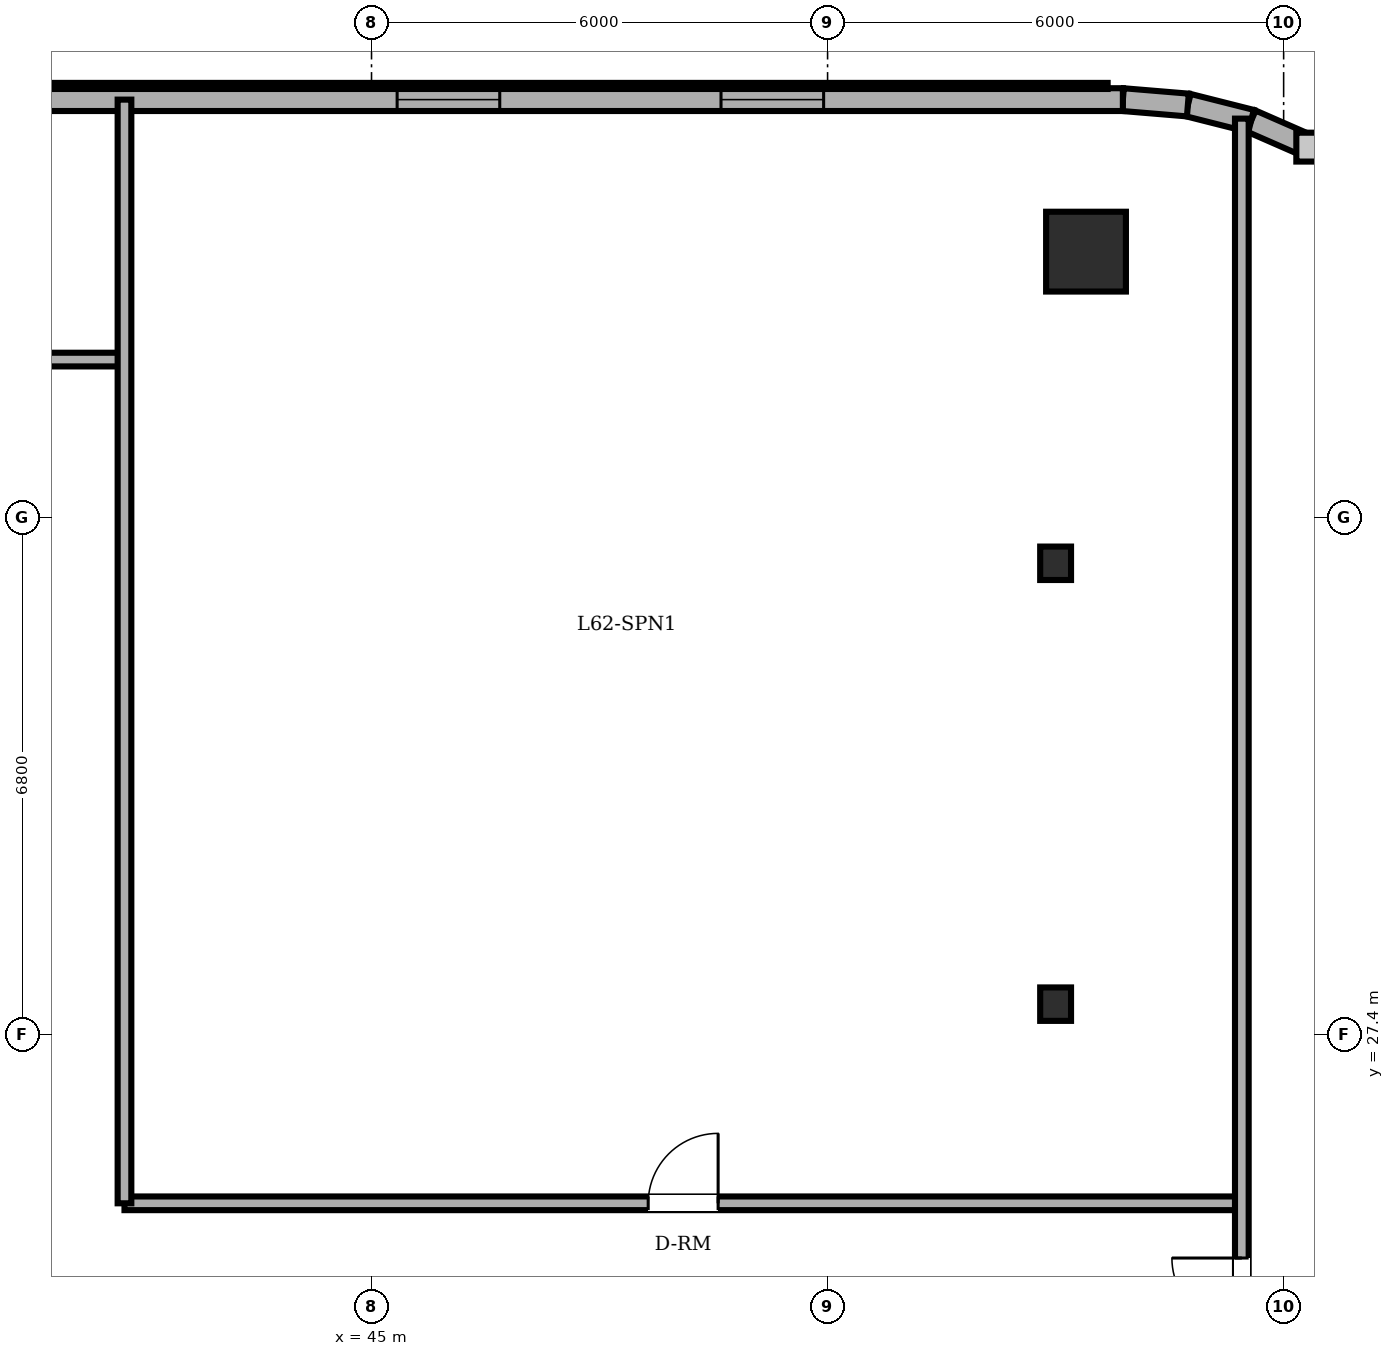
"""IFC4 building model, lengths in metres.
Left out: names, types, materials, properties, quantities, classifications, styles, units other than length and angle.
Written with IfcOpenShell. Run it as: python <this file> out.ifc"""

import sys

from ifc_helpers import new_model, si_unit, direction, frame, frame_2d, origin, origin_2d, place, context, subcontext, project, spatial, rectangle, circle, i_section, extrude, element, fill, save


model = new_model("IFC4")
c1 = context("Model", 3, precision=1e-05, world=origin(), true_north=direction((0.0, 1.0)))
c2 = subcontext(c1, "Body", "Model", "MODEL_VIEW")
j1 = project(units=[si_unit("LENGTHUNIT", "METRE"), si_unit("PLANEANGLEUNIT", "RADIAN")], contexts=[c1])
p1 = place(None, origin())
s1 = spatial("IfcSite", under=j1, at=p1, CompositionType="ELEMENT")
p2 = place(p1, origin())
s2 = spatial("IfcBuilding", under=s1, at=p2, CompositionType="ELEMENT")
p3 = place(p2, frame((0.0, 0.0, 237.3)))
s3 = spatial("IfcBuildingStorey", under=s2, at=p3, CompositionType="ELEMENT", Elevation=237.3)
p4 = place(p3, frame((54.4, 37.7, 0.0), z_axis=(0.0, 0.0, 1.0), x_axis=(1.0, 0.0, 0.0)))
e1 = element("IfcColumn", 1, at=p4, inside=s3, PredefinedType="COLUMN", context=c2, shape_type="SweptSolid", body=[
    extrude(circle(Radius=0.525, at=origin_2d()), origin(), (0.0, 0.0, 1.0), 3.6),
])
for number, where, z_axis, x_axis in (
    (2, (54.0, 27.8, 0.0), (0.0, 0.0, 1.0), (1.0, 0.0, 0.0)),
    (3, (54.0, 33.6, 0.0), (0.0, 0.0, 1.0), (1.0, 0.0, 0.0)),
):
    element("IfcColumn", number, at=place(p3, frame(where, z_axis=z_axis, x_axis=x_axis)), inside=s3, PredefinedType="COLUMN", context=c2, shape_type="SweptSolid", body=[
        extrude(i_section(OverallWidth=0.406, OverallDepth=0.44, WebThickness=0.024, FlangeThickness=0.039, FilletRadius=0.015, at=origin_2d()), origin(), (0.0, 0.0, 1.0), 3.6),
    ])
p5 = place(p3, frame((57.357, 39.075, 0.0), z_axis=(0.0, 0.0, 1.0), x_axis=(-0.916085473636, 0.400983048261, 0.0)))
e4 = element("IfcWall", 4, at=p5, inside=s3, PredefinedType="SOLIDWALL", context=c2, shape_type="SweptSolid", body=[
    extrude(rectangle(XDim=0.858, YDim=0.3, at=frame_2d((0.429, 0.0))), origin(), (0.0, 0.0, 1.0), 3.4),
])
p6 = place(p3, frame((56.571, 39.419, 0.0), z_axis=(0.0, 0.0, 1.0), x_axis=(-0.969536346338, 0.244947490555, 0.0)))
e5 = element("IfcWall", 5, at=p6, inside=s3, PredefinedType="SOLIDWALL", context=c2, shape_type="SweptSolid", body=[
    extrude(rectangle(XDim=0.857, YDim=0.3, at=frame_2d((0.429, 0.0))), origin(), (0.0, 0.0, 1.0), 3.4),
])
p7 = place(p3, frame((55.74, 39.629, 0.0), z_axis=(0.0, 0.0, 1.0), x_axis=(-0.996565355958, 0.082809971041, 0.0)))
e6 = element("IfcWall", 6, at=p7, inside=s3, PredefinedType="SOLIDWALL", context=c2, shape_type="SweptSolid", body=[
    extrude(rectangle(XDim=0.858, YDim=0.3, at=frame_2d((0.429, 0.0))), origin(), (0.0, 0.0, 1.0), 3.4),
])
p8 = place(p3, frame((54.885, 39.7, 0.0), z_axis=(0.0, 0.0, 1.0), x_axis=(-1.0, 0.0, 0.0)))
e7 = element("IfcWall", 7, at=p8, inside=s3, PredefinedType="SOLIDWALL", context=c2, shape_type="SweptSolid", body=[
    extrude(rectangle(XDim=32.485, YDim=0.3, at=frame_2d((16.243, 0.0))), origin(), (0.0, 0.0, 1.0), 3.4),
])
p9 = place(p8, frame((27.685, 0.0, 0.0)))
e8 = element("IfcOpeningElement", 8, at=p9, cuts=e7, PredefinedType="OPENING", context=c2, shape_type="SweptSolid", body=[
    extrude(rectangle(XDim=0.95, YDim=2.2, at=frame_2d((0.475, 1.1))), frame((0.0, 0.16, 0.0), z_axis=(0.0, -1.0, 0.0), x_axis=(1.0, 0.0, 0.0)), (0.0, 0.0, 1.0), 0.32),
])
p10 = place(p8, frame((3.937, 0.0, 0.85)))
e9 = element("IfcOpeningElement", 9, at=p10, cuts=e7, PredefinedType="OPENING", context=c2, shape_type="SweptSolid", body=[
    extrude(rectangle(XDim=1.35, YDim=1.55, at=frame_2d((0.675, 0.775))), frame((0.0, 0.16, 0.0), z_axis=(0.0, -1.0, 0.0), x_axis=(1.0, 0.0, 0.0)), (0.0, 0.0, 1.0), 0.32),
])
p11 = place(p8, frame((8.198, 0.0, 0.85)))
e10 = element("IfcOpeningElement", 10, at=p11, cuts=e7, PredefinedType="OPENING", context=c2, shape_type="SweptSolid", body=[
    extrude(rectangle(XDim=1.35, YDim=1.55, at=frame_2d((0.675, 0.775))), frame((0.0, 0.16, 0.0), z_axis=(0.0, -1.0, 0.0), x_axis=(1.0, 0.0, 0.0)), (0.0, 0.0, 1.0), 0.32),
])
p12 = place(p8, frame((15.31, 0.0, 0.85)))
e11 = element("IfcOpeningElement", 11, at=p12, cuts=e7, PredefinedType="OPENING", context=c2, shape_type="SweptSolid", body=[
    extrude(rectangle(XDim=1.35, YDim=1.55, at=frame_2d((0.675, 0.775))), frame((0.0, 0.16, 0.0), z_axis=(0.0, -1.0, 0.0), x_axis=(1.0, 0.0, 0.0)), (0.0, 0.0, 1.0), 0.32),
])
p13 = place(p8, frame((18.16, 0.0, 0.85)))
e12 = element("IfcOpeningElement", 12, at=p13, cuts=e7, PredefinedType="OPENING", context=c2, shape_type="SweptSolid", body=[
    extrude(rectangle(XDim=1.35, YDim=1.55, at=frame_2d((0.675, 0.775))), frame((0.0, 0.16, 0.0), z_axis=(0.0, -1.0, 0.0), x_axis=(1.0, 0.0, 0.0)), (0.0, 0.0, 1.0), 0.32),
])
p14 = place(p8, frame((22.91, 0.0, 0.85)))
e13 = element("IfcOpeningElement", 13, at=p14, cuts=e7, PredefinedType="OPENING", context=c2, shape_type="SweptSolid", body=[
    extrude(rectangle(XDim=1.35, YDim=1.55, at=frame_2d((0.675, 0.775))), frame((0.0, 0.16, 0.0), z_axis=(0.0, -1.0, 0.0), x_axis=(1.0, 0.0, 0.0)), (0.0, 0.0, 1.0), 0.32),
])
p15 = place(p8, frame((29.835, 0.0, 0.85)))
e14 = element("IfcOpeningElement", 14, at=p15, cuts=e7, PredefinedType="OPENING", context=c2, shape_type="SweptSolid", body=[
    extrude(rectangle(XDim=1.35, YDim=1.55, at=frame_2d((0.675, 0.775))), frame((0.0, 0.16, 0.0), z_axis=(0.0, -1.0, 0.0), x_axis=(1.0, 0.0, 0.0)), (0.0, 0.0, 1.0), 0.32),
])
p16 = place(p3, frame((41.75, 25.18, 0.0), z_axis=(0.0, 0.0, 1.0), x_axis=(1.0, 0.0, 0.0)))
e15 = element("IfcWall", 15, at=p16, inside=s3, PredefinedType="PARTITIONING", context=c2, shape_type="SweptSolid", body=[
    extrude(rectangle(XDim=14.7, YDim=0.18, at=frame_2d((7.35, 0.0))), origin(), (0.0, 0.0, 1.0), 3.4),
])
p17 = place(p16, frame((6.89, 0.0, 0.0)))
e16 = element("IfcOpeningElement", 16, at=p17, cuts=e15, PredefinedType="OPENING", context=c2, shape_type="SweptSolid", body=[
    extrude(rectangle(XDim=0.92, YDim=2.1, at=frame_2d((0.46, 1.05))), frame((0.0, 0.1, 0.0), z_axis=(0.0, -1.0, 0.0), x_axis=(1.0, 0.0, 0.0)), (0.0, 0.0, 1.0), 0.2),
])
p18 = place(p3, frame((17.677, 36.28, 0.0), z_axis=(0.0, 0.0, 1.0), x_axis=(1.0, 0.0, 0.0)))
e17 = element("IfcWall", 17, at=p18, inside=s3, PredefinedType="PARTITIONING", context=c2, shape_type="SweptSolid", body=[
    extrude(rectangle(XDim=24.073, YDim=0.18, at=frame_2d((12.037, 0.0))), origin(), (0.0, 0.0, 1.0), 3.4),
])
p19 = place(p18, frame((9.573, 0.0, 0.0)))
e18 = element("IfcOpeningElement", 18, at=p19, cuts=e17, PredefinedType="OPENING", context=c2, shape_type="SweptSolid", body=[
    extrude(rectangle(XDim=0.9, YDim=2.1, at=frame_2d((0.45, 1.05))), frame((0.0, 0.1, 0.0), z_axis=(0.0, -1.0, 0.0), x_axis=(1.0, 0.0, 0.0)), (0.0, 0.0, 1.0), 0.2),
])
p20 = place(p18, frame((13.193, 0.0, 0.0)))
e19 = element("IfcOpeningElement", 19, at=p20, cuts=e17, PredefinedType="OPENING", context=c2, shape_type="SweptSolid", body=[
    extrude(rectangle(XDim=0.86, YDim=2.1, at=frame_2d((0.43, 1.05))), frame((0.0, 0.1, 0.0), z_axis=(0.0, -1.0, 0.0), x_axis=(1.0, 0.0, 0.0)), (0.0, 0.0, 1.0), 0.2),
])
p21 = place(p18, frame((4.063, 0.0, 0.0)))
e20 = element("IfcOpeningElement", 20, at=p21, cuts=e17, PredefinedType="OPENING", context=c2, shape_type="SweptSolid", body=[
    extrude(rectangle(XDim=0.92, YDim=2.1, at=frame_2d((0.46, 1.05))), frame((0.0, 0.1, 0.0), z_axis=(0.0, -1.0, 0.0), x_axis=(1.0, 0.0, 0.0)), (0.0, 0.0, 1.0), 0.2),
])
p22 = place(p18, frame((19.038, 0.0, 0.0)))
e21 = element("IfcOpeningElement", 21, at=p22, cuts=e17, PredefinedType="OPENING", context=c2, shape_type="SweptSolid", body=[
    extrude(rectangle(XDim=1.0, YDim=2.15, at=frame_2d((0.5, 1.075))), frame((0.0, 0.1, 0.0), z_axis=(0.0, -1.0, 0.0), x_axis=(1.0, 0.0, 0.0)), (0.0, 0.0, 1.0), 0.2),
])
p23 = place(p3, frame((41.75, 25.18, 0.0), z_axis=(0.0, 0.0, 1.0), x_axis=(0.0, 1.0, 0.0)))
e22 = element("IfcWall", 22, at=p23, inside=s3, PredefinedType="PARTITIONING", context=c2, shape_type="SweptSolid", body=[
    extrude(rectangle(XDim=14.52, YDim=0.18, at=frame_2d((7.26, 0.0))), origin(), (0.0, 0.0, 1.0), 3.4),
])
p24 = place(p3, frame((56.45, 8.55, 0.0), z_axis=(0.0, 0.0, 1.0), x_axis=(0.0, 1.0, 0.0)))
e23 = element("IfcWall", 23, at=p24, inside=s3, PredefinedType="PARTITIONING", context=c2, shape_type="SweptSolid", body=[
    extrude(rectangle(XDim=30.9, YDim=0.18, at=frame_2d((15.45, 0.0))), origin(), (0.0, 0.0, 1.0), 3.4),
])
p25 = place(p24, frame((14.99, 0.0, 0.0)))
e24 = element("IfcOpeningElement", 24, at=p25, cuts=e23, PredefinedType="OPENING", context=c2, shape_type="SweptSolid", body=[
    extrude(rectangle(XDim=0.92, YDim=2.1, at=frame_2d((0.46, 1.05))), frame((0.0, 0.1, 0.0), z_axis=(0.0, -1.0, 0.0), x_axis=(1.0, 0.0, 0.0)), (0.0, 0.0, 1.0), 0.2),
])
p26 = place(p10, origin())
e25 = element("IfcWindow", 25, at=p26, inside=s3, PartitioningType="SINGLE_PANEL", PredefinedType="WINDOW", context=c2, shape_type="SweptSolid", body=[
    extrude(rectangle(XDim=1.35, YDim=1.55, at=frame_2d((0.675, 0.775))), frame((0.0, 0.03, 0.0), z_axis=(0.0, -1.0, 0.0), x_axis=(1.0, 0.0, 0.0)), (0.0, 0.0, 1.0), 0.06),
])
fill(e9, e25)
p27 = place(p11, origin())
e26 = element("IfcWindow", 26, at=p27, inside=s3, PartitioningType="SINGLE_PANEL", PredefinedType="WINDOW", context=c2, shape_type="SweptSolid", body=[
    extrude(rectangle(XDim=1.35, YDim=1.55, at=frame_2d((0.675, 0.775))), frame((0.0, 0.03, 0.0), z_axis=(0.0, -1.0, 0.0), x_axis=(1.0, 0.0, 0.0)), (0.0, 0.0, 1.0), 0.06),
])
fill(e10, e26)
p28 = place(p17, origin())
e27 = element("IfcDoor", 27, at=p28, inside=s3, OperationType="SINGLE_SWING_RIGHT", PredefinedType="DOOR", context=c2, shape_type="SweptSolid", body=[
    extrude(rectangle(XDim=0.92, YDim=2.1, at=frame_2d((0.46, 1.05))), frame((0.0, 0.025, 0.0), z_axis=(0.0, -1.0, 0.0), x_axis=(1.0, 0.0, 0.0)), (0.0, 0.0, 1.0), 0.05),
])
fill(e16, e27)
p29 = place(p25, origin())
e28 = element("IfcDoor", 28, at=p29, inside=s3, OperationType="SINGLE_SWING_RIGHT", PredefinedType="DOOR", context=c2, shape_type="SweptSolid", body=[
    extrude(rectangle(XDim=0.92, YDim=2.1, at=frame_2d((0.46, 1.05))), frame((0.0, 0.025, 0.0), z_axis=(0.0, -1.0, 0.0), x_axis=(1.0, 0.0, 0.0)), (0.0, 0.0, 1.0), 0.05),
])
fill(e24, e28)
save(model, sys.argv[1])
